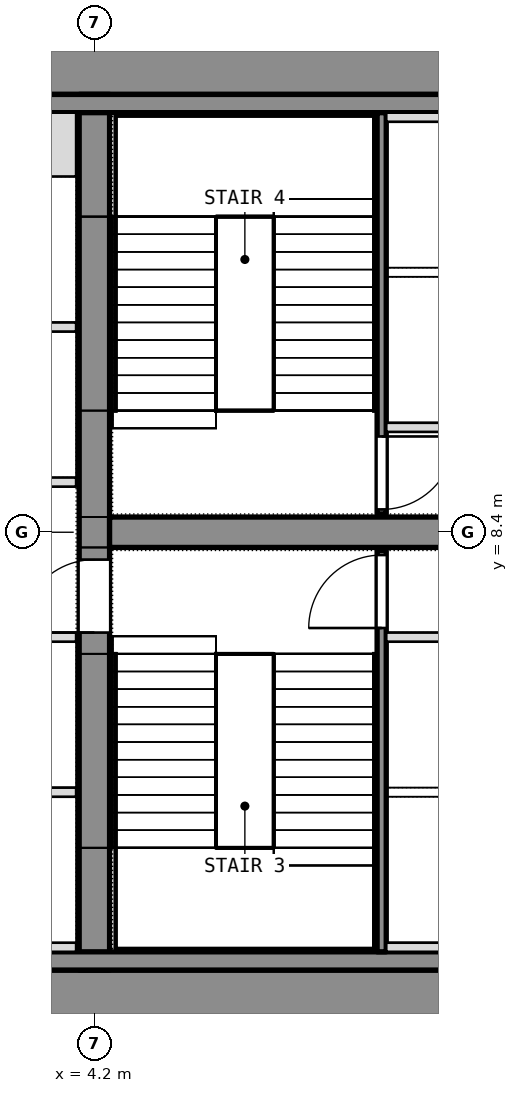
"""IFC4 building model, lengths in metres.
Left out: names, types, materials, properties, quantities, classifications, styles, units other than length and angle.
Written with IfcOpenShell. Run it as: python <this file> out.ifc"""

import sys

from ifc_helpers import new_model, si_unit, direction, frame, frame_2d, origin, place, context, subcontext, project, spatial, rectangle, extrude, element, fill, save


model = new_model("IFC4")
c1 = context("Model", 3, precision=1e-05, world=origin(), true_north=direction((0.0, 1.0)))
c2 = subcontext(c1, "Body", "Model", "MODEL_VIEW")
j1 = project(units=[si_unit("LENGTHUNIT", "METRE"), si_unit("PLANEANGLEUNIT", "RADIAN")], contexts=[c1])
p1 = place(None, origin())
s1 = spatial("IfcSite", under=j1, at=p1, CompositionType="ELEMENT")
p2 = place(p1, origin())
s2 = spatial("IfcBuilding", under=s1, at=p2, CompositionType="ELEMENT")
p3 = place(p2, frame((0.0, 0.0, 86.9)))
s3 = spatial("IfcBuildingStorey", under=s2, at=p3, CompositionType="ELEMENT", Elevation=86.9)
p4 = place(p3, frame((-11.1, 0.6, 0.0), z_axis=(0.0, 0.0, 1.0), x_axis=(1.0, 0.0, 0.0)))
e1 = element("IfcWall", 1, at=p4, inside=s3, PredefinedType="SHEAR", context=c2, shape_type="SweptSolid", body=[
    extrude(rectangle(XDim=22.2, YDim=1.2, at=frame_2d((11.1, 0.0))), origin(), (0.0, 0.0, 1.0), 10.8),
])
p5 = place(p4, frame((10.85, 0.0, 0.0)))
e2 = element("IfcOpeningElement", 2, at=p5, cuts=e1, PredefinedType="OPENING", context=c2, shape_type="SweptSolid", body=[
    extrude(rectangle(XDim=1.4, YDim=2.1, at=frame_2d((0.7, 1.05))), frame((0.0, 0.6, 0.0), z_axis=(0.0, -1.0, 0.0), x_axis=(1.0, 0.0, 0.0)), (0.0, 0.0, 1.0), 1.2),
])
p6 = place(p3, frame((-11.1, 16.2, 0.0), z_axis=(0.0, 0.0, 1.0), x_axis=(1.0, 0.0, 0.0)))
e3 = element("IfcWall", 3, at=p6, inside=s3, PredefinedType="SHEAR", context=c2, shape_type="SweptSolid", body=[
    extrude(rectangle(XDim=22.2, YDim=1.2, at=frame_2d((11.1, 0.0))), origin(), (0.0, 0.0, 1.0), 10.8),
])
p7 = place(p6, frame((10.4, 0.0, 0.0)))
e4 = element("IfcOpeningElement", 4, at=p7, cuts=e3, PredefinedType="OPENING", context=c2, shape_type="SweptSolid", body=[
    extrude(rectangle(XDim=1.4, YDim=2.1, at=frame_2d((0.7, 1.05))), frame((0.0, 0.6, 0.0), z_axis=(0.0, -1.0, 0.0), x_axis=(1.0, 0.0, 0.0)), (0.0, 0.0, 1.0), 1.2),
])
p8 = place(p3, frame((4.2, 1.2, 0.0), z_axis=(0.0, 0.0, 1.0), x_axis=(0.0, 1.0, 0.0)))
e5 = element("IfcWall", 5, at=p8, inside=s3, PredefinedType="SHEAR", context=c2, shape_type="SweptSolid", body=[
    extrude(rectangle(XDim=14.4, YDim=0.5, at=frame_2d((7.2, 0.0))), origin(), (0.0, 0.0, 1.0), 10.8),
])
p9 = place(p8, frame((5.55, 0.0, 0.0)))
e6 = element("IfcOpeningElement", 6, at=p9, cuts=e5, PredefinedType="OPENING", context=c2, shape_type="SweptSolid", body=[
    extrude(rectangle(XDim=1.2, YDim=2.1, at=frame_2d((0.6, 1.05))), frame((0.0, 0.25, 0.0), z_axis=(0.0, -1.0, 0.0), x_axis=(1.0, 0.0, 0.0)), (0.0, 0.0, 1.0), 0.5),
])
p10 = place(p3, frame((4.45, 8.4, 0.0), z_axis=(0.0, 0.0, 1.0), x_axis=(1.0, 0.0, 0.0)))
e7 = element("IfcWall", 7, at=p10, inside=s3, PredefinedType="SHEAR", context=c2, shape_type="SweptSolid", body=[
    extrude(rectangle(XDim=6.65, YDim=0.5, at=frame_2d((3.325, 0.0))), origin(), (0.0, 0.0, 1.0), 10.8),
])
p11 = place(p3, frame((1.15, 1.35, 0.0), z_axis=(0.0, 0.0, 1.0), x_axis=(1.0, 0.0, 0.0)))
e8 = element("IfcWall", 8, at=p11, inside=s3, PredefinedType="PARTITIONING", context=c2, shape_type="SweptSolid", body=[
    extrude(rectangle(XDim=9.95, YDim=0.3, at=frame_2d((4.975, 0.0))), origin(), (0.0, 0.0, 1.0), 10.54),
])
p12 = place(p3, frame((0.9, 15.45, 0.0), z_axis=(0.0, 0.0, 1.0), x_axis=(1.0, 0.0, 0.0)))
e9 = element("IfcWall", 9, at=p12, inside=s3, PredefinedType="PARTITIONING", context=c2, shape_type="SweptSolid", body=[
    extrude(rectangle(XDim=10.2, YDim=0.3, at=frame_2d((5.1, 0.0))), origin(), (0.0, 0.0, 1.0), 10.54),
])
p13 = place(p3, frame((8.925, 1.5, 0.0), z_axis=(0.0, 0.0, 1.0), x_axis=(0.0, 1.0, 0.0)))
e10 = element("IfcWall", 10, at=p13, inside=s3, PredefinedType="SHEAR", context=c2, shape_type="SweptSolid", body=[
    extrude(rectangle(XDim=6.6, YDim=0.15, at=frame_2d((3.3, 0.0))), origin(), (0.0, 0.0, 1.0), 10.54),
])
p14 = place(p13, frame((5.325, 0.0, 0.0)))
e11 = element("IfcOpeningElement", 11, at=p14, cuts=e10, PredefinedType="OPENING", context=c2, shape_type="SweptSolid", body=[
    extrude(rectangle(XDim=1.2, YDim=2.1, at=frame_2d((0.6, 1.05))), frame((0.0, 0.075, 0.0), z_axis=(0.0, -1.0, 0.0), x_axis=(1.0, 0.0, 0.0)), (0.0, 0.0, 1.0), 0.15),
])
for number, where, z_axis, x_axis in (
    (12, (9.0, 6.675, 0.0), (0.0, 0.0, 1.0), (1.0, 0.0, 0.0)),
    (13, (9.0, 1.575, 0.0), (0.0, 0.0, 1.0), (1.0, 0.0, 0.0)),
):
    element("IfcWall", number, at=place(p3, frame(where, z_axis=z_axis, x_axis=x_axis)), inside=s3, PredefinedType="SHEAR", context=c2, shape_type="SweptSolid", body=[
        extrude(rectangle(XDim=2.1, YDim=0.15, at=frame_2d((1.05, 0.0))), origin(), (0.0, 0.0, 1.0), 10.8),
    ])
p15 = place(p3, frame((8.925, 8.7, 0.0), z_axis=(0.0, 0.0, 1.0), x_axis=(0.0, 1.0, 0.0)))
e14 = element("IfcWall", 14, at=p15, inside=s3, PredefinedType="SHEAR", context=c2, shape_type="SweptSolid", body=[
    extrude(rectangle(XDim=6.6, YDim=0.15, at=frame_2d((3.3, 0.0))), origin(), (0.0, 0.0, 1.0), 10.54),
])
p16 = place(p15, frame((0.075, 0.0, 0.0)))
e15 = element("IfcOpeningElement", 15, at=p16, cuts=e14, PredefinedType="OPENING", context=c2, shape_type="SweptSolid", body=[
    extrude(rectangle(XDim=1.2, YDim=2.1, at=frame_2d((0.6, 1.05))), frame((0.0, 0.075, 0.0), z_axis=(0.0, -1.0, 0.0), x_axis=(1.0, 0.0, 0.0)), (0.0, 0.0, 1.0), 0.15),
])
for number, where, z_axis, x_axis in (
    (16, (9.0, 10.125, 0.0), (0.0, 0.0, 1.0), (1.0, 0.0, 0.0)),
    (17, (9.0, 15.225, 0.0), (0.0, 0.0, 1.0), (1.0, 0.0, 0.0)),
):
    element("IfcWall", number, at=place(p3, frame(where, z_axis=z_axis, x_axis=x_axis)), inside=s3, PredefinedType="SHEAR", context=c2, shape_type="SweptSolid", body=[
        extrude(rectangle(XDim=2.1, YDim=0.15, at=frame_2d((1.05, 0.0))), origin(), (0.0, 0.0, 1.0), 10.8),
    ])
p17 = place(p3, frame((-3.9, 4.125, 0.0), z_axis=(0.0, 0.0, 1.0), x_axis=(1.0, 0.0, 0.0)))
e18 = element("IfcWall", 18, at=p17, inside=s3, PredefinedType="PARTITIONING", context=c2, shape_type="SweptSolid", body=[
    extrude(rectangle(XDim=7.8, YDim=0.15, at=frame_2d((3.9, 0.0))), origin(), (0.0, 0.0, 1.0), 10.54),
])
p18 = place(p17, frame((3.75, 0.0, 0.0)))
e19 = element("IfcOpeningElement", 19, at=p18, cuts=e18, PredefinedType="OPENING", context=c2, shape_type="SweptSolid", body=[
    extrude(rectangle(XDim=1.2, YDim=2.1, at=frame_2d((0.6, 1.05))), frame((0.0, 0.075, 0.0), z_axis=(0.0, -1.0, 0.0), x_axis=(1.0, 0.0, 0.0)), (0.0, 0.0, 1.0), 0.15),
])
p19 = place(p3, frame((-3.9, 11.775, 0.0), z_axis=(0.0, 0.0, 1.0), x_axis=(1.0, 0.0, 0.0)))
e20 = element("IfcWall", 20, at=p19, inside=s3, PredefinedType="PARTITIONING", context=c2, shape_type="SweptSolid", body=[
    extrude(rectangle(XDim=7.8, YDim=0.15, at=frame_2d((3.9, 0.0))), origin(), (0.0, 0.0, 1.0), 10.54),
])
p20 = place(p19, frame((3.3, 0.0, 0.0)))
e21 = element("IfcOpeningElement", 21, at=p20, cuts=e20, PredefinedType="OPENING", context=c2, shape_type="SweptSolid", body=[
    extrude(rectangle(XDim=1.2, YDim=2.1, at=frame_2d((0.6, 1.05))), frame((0.0, 0.075, 0.0), z_axis=(0.0, -1.0, 0.0), x_axis=(1.0, 0.0, 0.0)), (0.0, 0.0, 1.0), 0.15),
])
p21 = place(p3, frame((1.65, 1.575, 0.0), z_axis=(0.0, 0.0, 1.0), x_axis=(1.0, 0.0, 0.0)))
e22 = element("IfcWall", 22, at=p21, inside=s3, PredefinedType="SHEAR", context=c2, shape_type="SweptSolid", body=[
    extrude(rectangle(XDim=2.25, YDim=0.15, at=frame_2d((1.125, 0.0))), origin(), (0.0, 0.0, 1.0), 10.8),
])
p22 = place(p3, frame((1.65, 14.775, 0.0), z_axis=(0.0, 0.0, 1.0), x_axis=(1.0, 0.0, 0.0)))
e23 = element("IfcWall", 23, at=p22, inside=s3, PredefinedType="SHEAR", context=c2, shape_type="SweptSolid", body=[
    extrude(rectangle(XDim=2.25, YDim=1.05, at=frame_2d((1.125, 0.0))), origin(), (0.0, 0.0, 1.0), 10.8),
])
for number, where, z_axis, x_axis in (
    (24, (1.65, 6.675, 0.0), (0.0, 0.0, 1.0), (1.0, 0.0, 0.0)),
    (25, (1.65, 9.225, 0.0), (0.0, 0.0, 1.0), (1.0, 0.0, 0.0)),
):
    element("IfcWall", number, at=place(p3, frame(where, z_axis=z_axis, x_axis=x_axis)), inside=s3, PredefinedType="SHEAR", context=c2, shape_type="SweptSolid", body=[
        extrude(rectangle(XDim=2.25, YDim=0.15, at=frame_2d((1.125, 0.0))), origin(), (0.0, 0.0, 1.0), 10.8),
    ])
p23 = place(p14, origin())
e26 = element("IfcDoor", 26, at=p23, inside=s3, OperationType="SINGLE_SWING_LEFT", PredefinedType="DOOR", context=c2, shape_type="SweptSolid", body=[
    extrude(rectangle(XDim=1.2, YDim=2.1, at=frame_2d((0.6, 1.05))), frame((0.0, 0.025, 0.0), z_axis=(0.0, -1.0, 0.0), x_axis=(1.0, 0.0, 0.0)), (0.0, 0.0, 1.0), 0.05),
])
fill(e11, e26)
p24 = place(p16, origin())
e27 = element("IfcDoor", 27, at=p24, inside=s3, OperationType="SINGLE_SWING_LEFT", PredefinedType="DOOR", context=c2, shape_type="SweptSolid", body=[
    extrude(rectangle(XDim=1.2, YDim=2.1, at=frame_2d((0.6, 1.05))), frame((0.0, 0.025, 0.0), z_axis=(0.0, -1.0, 0.0), x_axis=(1.0, 0.0, 0.0)), (0.0, 0.0, 1.0), 0.05),
])
fill(e15, e27)
p25 = place(p9, origin())
e28 = element("IfcDoor", 28, at=p25, inside=s3, OperationType="SINGLE_SWING_LEFT", PredefinedType="DOOR", context=c2, shape_type="SweptSolid", body=[
    extrude(rectangle(XDim=1.2, YDim=2.1, at=frame_2d((0.6, 1.05))), frame((0.0, 0.025, 0.0), z_axis=(0.0, -1.0, 0.0), x_axis=(1.0, 0.0, 0.0)), (0.0, 0.0, 1.0), 0.05),
])
fill(e6, e28)
save(model, sys.argv[1])
